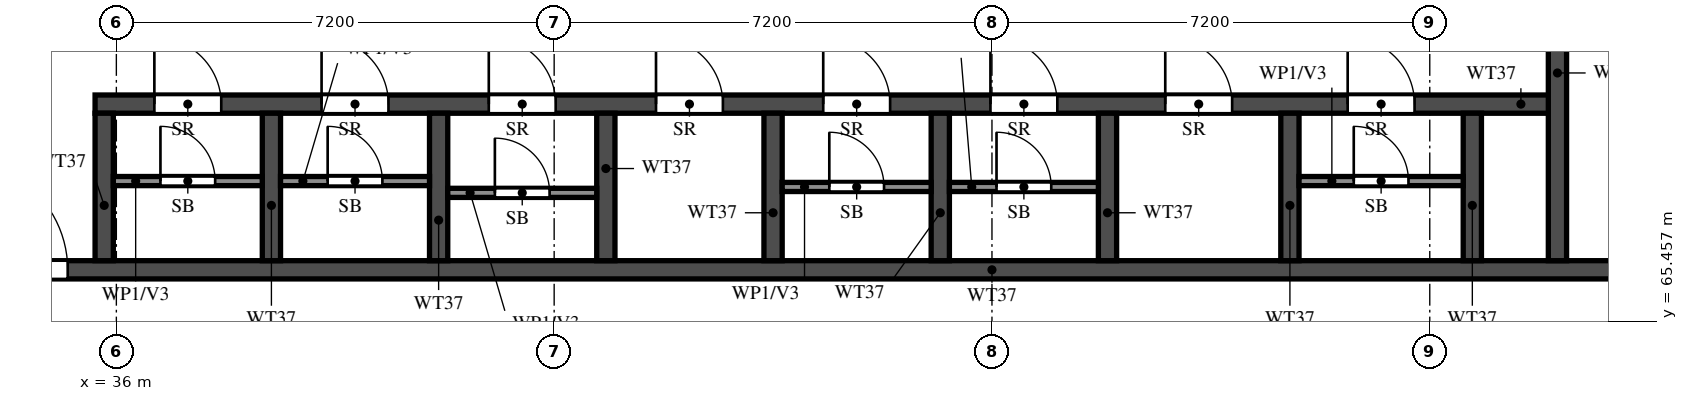
"""IFC4 building model, lengths in metres.
Left out: names, types, materials, properties, quantities, classifications, styles, units other than length and angle.
Written with IfcOpenShell. Run it as: python <this file> out.ifc"""

import sys

from ifc_helpers import new_model, si_unit, direction, frame, frame_2d, origin, place, context, subcontext, project, spatial, rectangle, extrude, element, fill, save


model = new_model("IFC4")
c1 = context("Model", 3, precision=1e-05, world=origin(), true_north=direction((0.0, 1.0)))
c2 = subcontext(c1, "Body", "Model", "MODEL_VIEW")
j1 = project(units=[si_unit("LENGTHUNIT", "METRE"), si_unit("PLANEANGLEUNIT", "RADIAN")], contexts=[c1])
p1 = place(None, origin())
s1 = spatial("IfcSite", under=j1, at=p1, CompositionType="ELEMENT")
p2 = place(p1, origin())
s2 = spatial("IfcBuilding", under=s1, at=p2, CompositionType="ELEMENT")
p3 = place(p2, frame((0.0, 0.0, 250.0)))
s3 = spatial("IfcBuildingStorey", under=s2, at=p3, CompositionType="ELEMENT", Elevation=250.0)
p4 = place(p3, frame((29.2, 66.3, 0.0), z_axis=(0.0, 0.0, 1.0), x_axis=(1.0, 0.0, 0.0)))
e1 = element("IfcWall", 1, at=p4, inside=s3, PredefinedType="SHEAR", context=c2, shape_type="SweptSolid", body=[
    extrude(rectangle(XDim=42.4, YDim=0.3, at=frame_2d((21.2, 0.0))), origin(), (0.0, 0.0, 1.0), 3.22),
])
p5 = place(p4, frame((1.425, 0.0, 0.0)))
e2 = element("IfcOpeningElement", 2, at=p5, cuts=e1, PredefinedType="OPENING", context=c2, shape_type="SweptSolid", body=[
    extrude(rectangle(XDim=1.1, YDim=2.1, at=frame_2d((0.55, 1.05))), frame((0.0, 0.16, 0.0), z_axis=(0.0, -1.0, 0.0), x_axis=(1.0, 0.0, 0.0)), (0.0, 0.0, 1.0), 0.32),
])
p6 = place(p4, frame((4.2, 0.0, 0.0)))
e3 = element("IfcOpeningElement", 3, at=p6, cuts=e1, PredefinedType="OPENING", context=c2, shape_type="SweptSolid", body=[
    extrude(rectangle(XDim=1.8, YDim=2.1, at=frame_2d((0.9, 1.05))), frame((0.0, 0.16, 0.0), z_axis=(0.0, -1.0, 0.0), x_axis=(1.0, 0.0, 0.0)), (0.0, 0.0, 1.0), 0.32),
])
p7 = place(p3, frame((35.65, 69.025, 0.0), z_axis=(0.0, 0.0, 1.0), x_axis=(1.0, 0.0, 0.0)))
e4 = element("IfcWall", 4, at=p7, inside=s3, PredefinedType="SHEAR", context=c2, shape_type="SweptSolid", body=[
    extrude(rectangle(XDim=24.05, YDim=0.3, at=frame_2d((12.025, 0.0))), origin(), (0.0, 0.0, 1.0), 3.22),
])
p8 = place(p7, frame((0.975, 0.0, 0.0)))
e5 = element("IfcOpeningElement", 5, at=p8, cuts=e4, PredefinedType="OPENING", context=c2, shape_type="SweptSolid", body=[
    extrude(rectangle(XDim=1.1, YDim=2.1, at=frame_2d((0.55, 1.05))), frame((0.0, 0.16, 0.0), z_axis=(0.0, -1.0, 0.0), x_axis=(1.0, 0.0, 0.0)), (0.0, 0.0, 1.0), 0.32),
])
p9 = place(p7, frame((3.725, 0.0, 0.0)))
e6 = element("IfcOpeningElement", 6, at=p9, cuts=e4, PredefinedType="OPENING", context=c2, shape_type="SweptSolid", body=[
    extrude(rectangle(XDim=1.1, YDim=2.1, at=frame_2d((0.55, 1.05))), frame((0.0, 0.16, 0.0), z_axis=(0.0, -1.0, 0.0), x_axis=(1.0, 0.0, 0.0)), (0.0, 0.0, 1.0), 0.32),
])
p10 = place(p7, frame((6.475, 0.0, 0.0)))
e7 = element("IfcOpeningElement", 7, at=p10, cuts=e4, PredefinedType="OPENING", context=c2, shape_type="SweptSolid", body=[
    extrude(rectangle(XDim=1.1, YDim=2.1, at=frame_2d((0.55, 1.05))), frame((0.0, 0.16, 0.0), z_axis=(0.0, -1.0, 0.0), x_axis=(1.0, 0.0, 0.0)), (0.0, 0.0, 1.0), 0.32),
])
p11 = place(p7, frame((9.225, 0.0, 0.0)))
e8 = element("IfcOpeningElement", 8, at=p11, cuts=e4, PredefinedType="OPENING", context=c2, shape_type="SweptSolid", body=[
    extrude(rectangle(XDim=1.1, YDim=2.1, at=frame_2d((0.55, 1.05))), frame((0.0, 0.16, 0.0), z_axis=(0.0, -1.0, 0.0), x_axis=(1.0, 0.0, 0.0)), (0.0, 0.0, 1.0), 0.32),
])
p12 = place(p7, frame((11.975, 0.0, 0.0)))
e9 = element("IfcOpeningElement", 9, at=p12, cuts=e4, PredefinedType="OPENING", context=c2, shape_type="SweptSolid", body=[
    extrude(rectangle(XDim=1.1, YDim=2.1, at=frame_2d((0.55, 1.05))), frame((0.0, 0.16, 0.0), z_axis=(0.0, -1.0, 0.0), x_axis=(1.0, 0.0, 0.0)), (0.0, 0.0, 1.0), 0.32),
])
p13 = place(p7, frame((14.725, 0.0, 0.0)))
e10 = element("IfcOpeningElement", 10, at=p13, cuts=e4, PredefinedType="OPENING", context=c2, shape_type="SweptSolid", body=[
    extrude(rectangle(XDim=1.1, YDim=2.1, at=frame_2d((0.55, 1.05))), frame((0.0, 0.16, 0.0), z_axis=(0.0, -1.0, 0.0), x_axis=(1.0, 0.0, 0.0)), (0.0, 0.0, 1.0), 0.32),
])
p14 = place(p7, frame((17.6, 0.0, 0.0)))
e11 = element("IfcOpeningElement", 11, at=p14, cuts=e4, PredefinedType="OPENING", context=c2, shape_type="SweptSolid", body=[
    extrude(rectangle(XDim=1.1, YDim=2.1, at=frame_2d((0.55, 1.05))), frame((0.0, 0.16, 0.0), z_axis=(0.0, -1.0, 0.0), x_axis=(1.0, 0.0, 0.0)), (0.0, 0.0, 1.0), 0.32),
])
p15 = place(p7, frame((20.6, 0.0, 0.0)))
e12 = element("IfcOpeningElement", 12, at=p15, cuts=e4, PredefinedType="OPENING", context=c2, shape_type="SweptSolid", body=[
    extrude(rectangle(XDim=1.1, YDim=2.1, at=frame_2d((0.55, 1.05))), frame((0.0, 0.16, 0.0), z_axis=(0.0, -1.0, 0.0), x_axis=(1.0, 0.0, 0.0)), (0.0, 0.0, 1.0), 0.32),
])
p16 = place(p3, frame((59.7, 66.45, 0.0), z_axis=(0.0, 0.0, 1.0), x_axis=(0.0, 1.0, 0.0)))
e13 = element("IfcWall", 13, at=p16, inside=s3, PredefinedType="SHEAR", context=c2, shape_type="SweptSolid", body=[
    extrude(rectangle(XDim=6.175, YDim=0.3, at=frame_2d((3.087, 0.0))), origin(), (0.0, 0.0, 1.0), 3.22),
])
p17 = place(p16, frame((3.85, 0.0, 0.0)))
e14 = element("IfcOpeningElement", 14, at=p17, cuts=e13, PredefinedType="OPENING", context=c2, shape_type="SweptSolid", body=[
    extrude(rectangle(XDim=1.2, YDim=2.1, at=frame_2d((0.6, 1.05))), frame((0.0, 0.16, 0.0), z_axis=(0.0, -1.0, 0.0), x_axis=(1.0, 0.0, 0.0)), (0.0, 0.0, 1.0), 0.32),
])
for number, where, z_axis, x_axis in (
    (15, (35.8, 66.45, 0.0), (0.0, 0.0, 1.0), (0.0, 1.0, 0.0)),
    (16, (38.55, 66.45, 0.0), (0.0, 0.0, 1.0), (0.0, 1.0, 0.0)),
    (17, (41.3, 66.45, 0.0), (0.0, 0.0, 1.0), (0.0, 1.0, 0.0)),
    (18, (44.05, 66.45, 0.0), (0.0, 0.0, 1.0), (0.0, 1.0, 0.0)),
    (19, (46.8, 66.45, 0.0), (0.0, 0.0, 1.0), (0.0, 1.0, 0.0)),
    (20, (49.55, 66.45, 0.0), (0.0, 0.0, 1.0), (0.0, 1.0, 0.0)),
    (21, (52.3, 66.45, 0.0), (0.0, 0.0, 1.0), (0.0, 1.0, 0.0)),
    (22, (55.3, 66.45, 0.0), (0.0, 0.0, 1.0), (0.0, 1.0, 0.0)),
    (23, (58.3, 66.45, 0.0), (0.0, 0.0, 1.0), (0.0, 1.0, 0.0)),
):
    element("IfcWall", number, at=place(p3, frame(where, z_axis=z_axis, x_axis=x_axis)), inside=s3, PredefinedType="SHEAR", context=c2, shape_type="SweptSolid", body=[
        extrude(rectangle(XDim=2.425, YDim=0.3, at=frame_2d((1.212, 0.0))), origin(), (0.0, 0.0, 1.0), 3.22),
    ])
p18 = place(p3, frame((35.95, 67.76, 0.0), z_axis=(0.0, 0.0, 1.0), x_axis=(1.0, 0.0, 0.0)))
e24 = element("IfcWall", 24, at=p18, inside=s3, PredefinedType="PARTITIONING", context=c2, shape_type="SweptSolid", body=[
    extrude(rectangle(XDim=2.45, YDim=0.15, at=frame_2d((1.225, 0.0))), origin(), (0.0, 0.0, 1.0), 3.22),
])
p19 = place(p18, frame((0.775, 0.0, 0.0)))
e25 = element("IfcOpeningElement", 25, at=p19, cuts=e24, PredefinedType="OPENING", context=c2, shape_type="SweptSolid", body=[
    extrude(rectangle(XDim=0.9, YDim=2.1, at=frame_2d((0.45, 1.05))), frame((0.0, 0.085, 0.0), z_axis=(0.0, -1.0, 0.0), x_axis=(1.0, 0.0, 0.0)), (0.0, 0.0, 1.0), 0.17),
])
p20 = place(p3, frame((38.7, 67.76, 0.0), z_axis=(0.0, 0.0, 1.0), x_axis=(1.0, 0.0, 0.0)))
e26 = element("IfcWall", 26, at=p20, inside=s3, PredefinedType="PARTITIONING", context=c2, shape_type="SweptSolid", body=[
    extrude(rectangle(XDim=2.45, YDim=0.15, at=frame_2d((1.225, 0.0))), origin(), (0.0, 0.0, 1.0), 3.22),
])
p21 = place(p20, frame((0.775, 0.0, 0.0)))
e27 = element("IfcOpeningElement", 27, at=p21, cuts=e26, PredefinedType="OPENING", context=c2, shape_type="SweptSolid", body=[
    extrude(rectangle(XDim=0.9, YDim=2.1, at=frame_2d((0.45, 1.05))), frame((0.0, 0.085, 0.0), z_axis=(0.0, -1.0, 0.0), x_axis=(1.0, 0.0, 0.0)), (0.0, 0.0, 1.0), 0.17),
])
p22 = place(p3, frame((41.45, 67.565, 0.0), z_axis=(0.0, 0.0, 1.0), x_axis=(1.0, 0.0, 0.0)))
e28 = element("IfcWall", 28, at=p22, inside=s3, PredefinedType="PARTITIONING", context=c2, shape_type="SweptSolid", body=[
    extrude(rectangle(XDim=2.45, YDim=0.15, at=frame_2d((1.225, 0.0))), origin(), (0.0, 0.0, 1.0), 3.22),
])
p23 = place(p22, frame((0.775, 0.0, 0.0)))
e29 = element("IfcOpeningElement", 29, at=p23, cuts=e28, PredefinedType="OPENING", context=c2, shape_type="SweptSolid", body=[
    extrude(rectangle(XDim=0.9, YDim=2.1, at=frame_2d((0.45, 1.05))), frame((0.0, 0.085, 0.0), z_axis=(0.0, -1.0, 0.0), x_axis=(1.0, 0.0, 0.0)), (0.0, 0.0, 1.0), 0.17),
])
p24 = place(p3, frame((46.95, 67.663, 0.0), z_axis=(0.0, 0.0, 1.0), x_axis=(1.0, 0.0, 0.0)))
e30 = element("IfcWall", 30, at=p24, inside=s3, PredefinedType="PARTITIONING", context=c2, shape_type="SweptSolid", body=[
    extrude(rectangle(XDim=2.45, YDim=0.15, at=frame_2d((1.225, 0.0))), origin(), (0.0, 0.0, 1.0), 3.22),
])
p25 = place(p24, frame((0.775, 0.0, 0.0)))
e31 = element("IfcOpeningElement", 31, at=p25, cuts=e30, PredefinedType="OPENING", context=c2, shape_type="SweptSolid", body=[
    extrude(rectangle(XDim=0.9, YDim=2.1, at=frame_2d((0.45, 1.05))), frame((0.0, 0.085, 0.0), z_axis=(0.0, -1.0, 0.0), x_axis=(1.0, 0.0, 0.0)), (0.0, 0.0, 1.0), 0.17),
])
p26 = place(p3, frame((49.7, 67.663, 0.0), z_axis=(0.0, 0.0, 1.0), x_axis=(1.0, 0.0, 0.0)))
e32 = element("IfcWall", 32, at=p26, inside=s3, PredefinedType="PARTITIONING", context=c2, shape_type="SweptSolid", body=[
    extrude(rectangle(XDim=2.45, YDim=0.15, at=frame_2d((1.225, 0.0))), origin(), (0.0, 0.0, 1.0), 3.22),
])
p27 = place(p26, frame((0.775, 0.0, 0.0)))
e33 = element("IfcOpeningElement", 33, at=p27, cuts=e32, PredefinedType="OPENING", context=c2, shape_type="SweptSolid", body=[
    extrude(rectangle(XDim=0.9, YDim=2.1, at=frame_2d((0.45, 1.05))), frame((0.0, 0.085, 0.0), z_axis=(0.0, -1.0, 0.0), x_axis=(1.0, 0.0, 0.0)), (0.0, 0.0, 1.0), 0.17),
])
p28 = place(p3, frame((55.45, 67.76, 0.0), z_axis=(0.0, 0.0, 1.0), x_axis=(1.0, 0.0, 0.0)))
e34 = element("IfcWall", 34, at=p28, inside=s3, PredefinedType="PARTITIONING", context=c2, shape_type="SweptSolid", body=[
    extrude(rectangle(XDim=2.7, YDim=0.15, at=frame_2d((1.35, 0.0))), origin(), (0.0, 0.0, 1.0), 3.22),
])
p29 = place(p28, frame((0.9, 0.0, 0.0)))
e35 = element("IfcOpeningElement", 35, at=p29, cuts=e34, PredefinedType="OPENING", context=c2, shape_type="SweptSolid", body=[
    extrude(rectangle(XDim=0.9, YDim=2.1, at=frame_2d((0.45, 1.05))), frame((0.0, 0.085, 0.0), z_axis=(0.0, -1.0, 0.0), x_axis=(1.0, 0.0, 0.0)), (0.0, 0.0, 1.0), 0.17),
])
p30 = place(p6, origin())
e36 = element("IfcDoor", 36, at=p30, inside=s3, OperationType="DOUBLE_DOOR_SINGLE_SWING", PredefinedType="DOOR", context=c2, shape_type="SweptSolid", body=[
    extrude(rectangle(XDim=1.8, YDim=2.1, at=frame_2d((0.9, 1.05))), frame((0.0, 0.025, 0.0), z_axis=(0.0, -1.0, 0.0), x_axis=(1.0, 0.0, 0.0)), (0.0, 0.0, 1.0), 0.05),
])
fill(e3, e36)
p31 = place(p8, origin())
e37 = element("IfcDoor", 37, at=p31, inside=s3, OperationType="SINGLE_SWING_RIGHT", PredefinedType="DOOR", context=c2, shape_type="SweptSolid", body=[
    extrude(rectangle(XDim=1.1, YDim=2.1, at=frame_2d((0.55, 1.05))), frame((0.0, 0.025, 0.0), z_axis=(0.0, -1.0, 0.0), x_axis=(1.0, 0.0, 0.0)), (0.0, 0.0, 1.0), 0.05),
])
fill(e5, e37)
p32 = place(p19, origin())
e38 = element("IfcDoor", 38, at=p32, inside=s3, OperationType="SINGLE_SWING_LEFT", PredefinedType="DOOR", context=c2, shape_type="SweptSolid", body=[
    extrude(rectangle(XDim=0.9, YDim=2.1, at=frame_2d((0.45, 1.05))), frame((0.0, 0.025, 0.0), z_axis=(0.0, -1.0, 0.0), x_axis=(1.0, 0.0, 0.0)), (0.0, 0.0, 1.0), 0.05),
])
fill(e25, e38)
p33 = place(p9, origin())
e39 = element("IfcDoor", 39, at=p33, inside=s3, OperationType="SINGLE_SWING_LEFT", PredefinedType="DOOR", context=c2, shape_type="SweptSolid", body=[
    extrude(rectangle(XDim=1.1, YDim=2.1, at=frame_2d((0.55, 1.05))), frame((0.0, 0.025, 0.0), z_axis=(0.0, -1.0, 0.0), x_axis=(1.0, 0.0, 0.0)), (0.0, 0.0, 1.0), 0.05),
])
fill(e6, e39)
p34 = place(p21, origin())
e40 = element("IfcDoor", 40, at=p34, inside=s3, OperationType="SINGLE_SWING_RIGHT", PredefinedType="DOOR", context=c2, shape_type="SweptSolid", body=[
    extrude(rectangle(XDim=0.9, YDim=2.1, at=frame_2d((0.45, 1.05))), frame((0.0, 0.025, 0.0), z_axis=(0.0, -1.0, 0.0), x_axis=(1.0, 0.0, 0.0)), (0.0, 0.0, 1.0), 0.05),
])
fill(e27, e40)
p35 = place(p10, origin())
e41 = element("IfcDoor", 41, at=p35, inside=s3, OperationType="SINGLE_SWING_RIGHT", PredefinedType="DOOR", context=c2, shape_type="SweptSolid", body=[
    extrude(rectangle(XDim=1.1, YDim=2.1, at=frame_2d((0.55, 1.05))), frame((0.0, 0.025, 0.0), z_axis=(0.0, -1.0, 0.0), x_axis=(1.0, 0.0, 0.0)), (0.0, 0.0, 1.0), 0.05),
])
fill(e7, e41)
p36 = place(p23, origin())
e42 = element("IfcDoor", 42, at=p36, inside=s3, OperationType="SINGLE_SWING_RIGHT", PredefinedType="DOOR", context=c2, shape_type="SweptSolid", body=[
    extrude(rectangle(XDim=0.9, YDim=2.1, at=frame_2d((0.45, 1.05))), frame((0.0, 0.025, 0.0), z_axis=(0.0, -1.0, 0.0), x_axis=(1.0, 0.0, 0.0)), (0.0, 0.0, 1.0), 0.05),
])
fill(e29, e42)
p37 = place(p11, origin())
e43 = element("IfcDoor", 43, at=p37, inside=s3, OperationType="SINGLE_SWING_LEFT", PredefinedType="DOOR", context=c2, shape_type="SweptSolid", body=[
    extrude(rectangle(XDim=1.1, YDim=2.1, at=frame_2d((0.55, 1.05))), frame((0.0, 0.025, 0.0), z_axis=(0.0, -1.0, 0.0), x_axis=(1.0, 0.0, 0.0)), (0.0, 0.0, 1.0), 0.05),
])
fill(e8, e43)
p38 = place(p12, origin())
e44 = element("IfcDoor", 44, at=p38, inside=s3, OperationType="SINGLE_SWING_RIGHT", PredefinedType="DOOR", context=c2, shape_type="SweptSolid", body=[
    extrude(rectangle(XDim=1.1, YDim=2.1, at=frame_2d((0.55, 1.05))), frame((0.0, 0.025, 0.0), z_axis=(0.0, -1.0, 0.0), x_axis=(1.0, 0.0, 0.0)), (0.0, 0.0, 1.0), 0.05),
])
fill(e9, e44)
p39 = place(p25, origin())
e45 = element("IfcDoor", 45, at=p39, inside=s3, OperationType="SINGLE_SWING_RIGHT", PredefinedType="DOOR", context=c2, shape_type="SweptSolid", body=[
    extrude(rectangle(XDim=0.9, YDim=2.1, at=frame_2d((0.45, 1.05))), frame((0.0, 0.025, 0.0), z_axis=(0.0, -1.0, 0.0), x_axis=(1.0, 0.0, 0.0)), (0.0, 0.0, 1.0), 0.05),
])
fill(e31, e45)
p40 = place(p13, origin())
e46 = element("IfcDoor", 46, at=p40, inside=s3, OperationType="SINGLE_SWING_LEFT", PredefinedType="DOOR", context=c2, shape_type="SweptSolid", body=[
    extrude(rectangle(XDim=1.1, YDim=2.1, at=frame_2d((0.55, 1.05))), frame((0.0, 0.025, 0.0), z_axis=(0.0, -1.0, 0.0), x_axis=(1.0, 0.0, 0.0)), (0.0, 0.0, 1.0), 0.05),
])
fill(e10, e46)
p41 = place(p27, origin())
e47 = element("IfcDoor", 47, at=p41, inside=s3, OperationType="SINGLE_SWING_LEFT", PredefinedType="DOOR", context=c2, shape_type="SweptSolid", body=[
    extrude(rectangle(XDim=0.9, YDim=2.1, at=frame_2d((0.45, 1.05))), frame((0.0, 0.025, 0.0), z_axis=(0.0, -1.0, 0.0), x_axis=(1.0, 0.0, 0.0)), (0.0, 0.0, 1.0), 0.05),
])
fill(e33, e47)
p42 = place(p14, origin())
e48 = element("IfcDoor", 48, at=p42, inside=s3, OperationType="SINGLE_SWING_RIGHT", PredefinedType="DOOR", context=c2, shape_type="SweptSolid", body=[
    extrude(rectangle(XDim=1.1, YDim=2.1, at=frame_2d((0.55, 1.05))), frame((0.0, 0.025, 0.0), z_axis=(0.0, -1.0, 0.0), x_axis=(1.0, 0.0, 0.0)), (0.0, 0.0, 1.0), 0.05),
])
fill(e11, e48)
p43 = place(p15, origin())
e49 = element("IfcDoor", 49, at=p43, inside=s3, OperationType="SINGLE_SWING_RIGHT", PredefinedType="DOOR", context=c2, shape_type="SweptSolid", body=[
    extrude(rectangle(XDim=1.1, YDim=2.1, at=frame_2d((0.55, 1.05))), frame((0.0, 0.025, 0.0), z_axis=(0.0, -1.0, 0.0), x_axis=(1.0, 0.0, 0.0)), (0.0, 0.0, 1.0), 0.05),
])
fill(e12, e49)
p44 = place(p29, origin())
e50 = element("IfcDoor", 50, at=p44, inside=s3, OperationType="SINGLE_SWING_LEFT", PredefinedType="DOOR", context=c2, shape_type="SweptSolid", body=[
    extrude(rectangle(XDim=0.9, YDim=2.1, at=frame_2d((0.45, 1.05))), frame((0.0, 0.025, 0.0), z_axis=(0.0, -1.0, 0.0), x_axis=(1.0, 0.0, 0.0)), (0.0, 0.0, 1.0), 0.05),
])
fill(e35, e50)
save(model, sys.argv[1])
